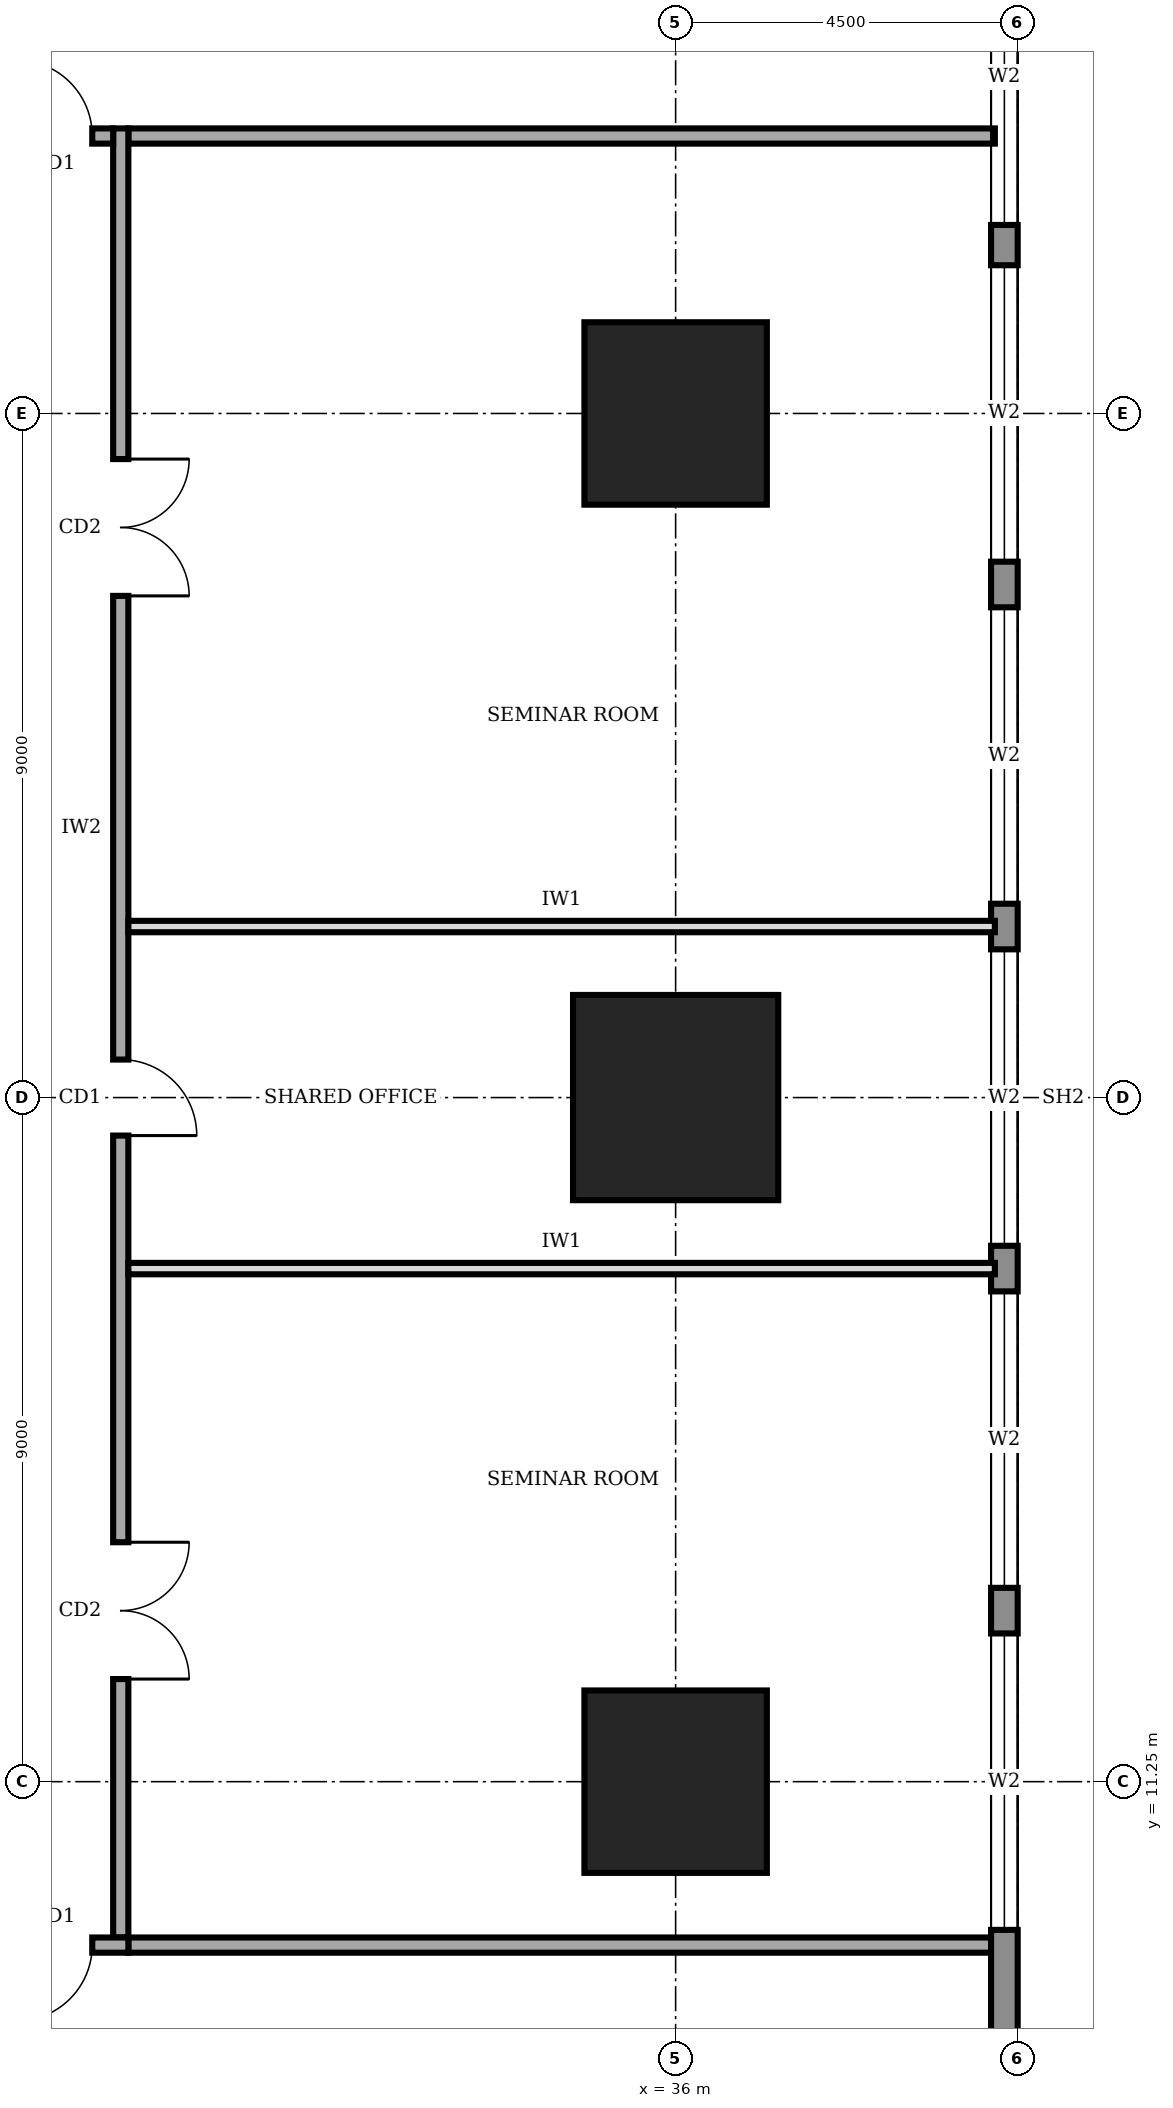
"""IFC4 building model, lengths in metres.
Left out: names, types, materials, properties, quantities, classifications, styles, units other than length and angle.
Written with IfcOpenShell. Run it as: python <this file> out.ifc"""

import sys

from ifc_helpers import new_model, si_unit, direction, frame, frame_2d, origin, origin_2d, place, context, subcontext, project, spatial, rectangle, extrude, element, fill, save


model = new_model("IFC4")
c1 = context("Model", 3, precision=1e-05, world=origin(), true_north=direction((0.0, 1.0)))
c2 = subcontext(c1, "Body", "Model", "MODEL_VIEW")
j1 = project(units=[si_unit("LENGTHUNIT", "METRE"), si_unit("PLANEANGLEUNIT", "RADIAN")], contexts=[c1])
p1 = place(None, origin())
s1 = spatial("IfcSite", under=j1, at=p1, CompositionType="ELEMENT")
p2 = place(p1, origin())
s2 = spatial("IfcBuilding", under=s1, at=p2, CompositionType="ELEMENT")
p3 = place(p2, frame((0.0, 0.0, 49.0)))
s3 = spatial("IfcBuildingStorey", under=s2, at=p3, CompositionType="ELEMENT", Elevation=49.0)
p4 = place(p3, frame((36.0, 11.25, 0.0), z_axis=(0.0, 0.0, 1.0), x_axis=(1.0, 0.0, 0.0)))
e1 = element("IfcColumn", 1, at=p4, inside=s3, PredefinedType="COLUMN", context=c2, shape_type="SweptSolid", body=[
    extrude(rectangle(XDim=2.4, YDim=2.4, at=origin_2d()), origin(), (0.0, 0.0, 1.0), 4.0),
])
p5 = place(p3, frame((36.0, 20.25, 0.0), z_axis=(0.0, 0.0, 1.0), x_axis=(1.0, 0.0, 0.0)))
e2 = element("IfcColumn", 2, at=p5, inside=s3, PredefinedType="COLUMN", context=c2, shape_type="SweptSolid", body=[
    extrude(rectangle(XDim=2.7, YDim=2.7, at=origin_2d()), origin(), (0.0, 0.0, 1.0), 4.0),
])
p6 = place(p3, frame((36.0, 29.25, 0.0), z_axis=(0.0, 0.0, 1.0), x_axis=(1.0, 0.0, 0.0)))
e3 = element("IfcColumn", 3, at=p6, inside=s3, PredefinedType="COLUMN", context=c2, shape_type="SweptSolid", body=[
    extrude(rectangle(XDim=2.4, YDim=2.4, at=origin_2d()), origin(), (0.0, 0.0, 1.0), 4.0),
])
p7 = place(p3, frame((40.325, 4.52, 0.0), z_axis=(0.0, 0.0, 1.0), x_axis=(0.0, 1.0, 0.0)))
e4 = element("IfcWall", 4, at=p7, inside=s3, PredefinedType="STANDARD", context=c2, shape_type="SweptSolid", body=[
    extrude(rectangle(XDim=31.46, YDim=0.35, at=frame_2d((15.73, 0.0))), origin(), (0.0, 0.0, 1.0), 3.75),
])
p8 = place(p7, frame((4.78, 0.0, 0.6)))
e5 = element("IfcOpeningElement", 5, at=p8, cuts=e4, PredefinedType="OPENING", context=c2, shape_type="SweptSolid", body=[
    extrude(rectangle(XDim=3.9, YDim=2.6, at=frame_2d((1.95, 1.3))), frame((0.0, 0.185, 0.0), z_axis=(0.0, -1.0, 0.0), x_axis=(1.0, 0.0, 0.0)), (0.0, 0.0, 1.0), 0.37),
])
p9 = place(p7, frame((9.28, 0.0, 0.6)))
e6 = element("IfcOpeningElement", 6, at=p9, cuts=e4, PredefinedType="OPENING", context=c2, shape_type="SweptSolid", body=[
    extrude(rectangle(XDim=3.9, YDim=2.6, at=frame_2d((1.95, 1.3))), frame((0.0, 0.185, 0.0), z_axis=(0.0, -1.0, 0.0), x_axis=(1.0, 0.0, 0.0)), (0.0, 0.0, 1.0), 0.37),
])
p10 = place(p7, frame((13.78, 0.0, 0.6)))
e7 = element("IfcOpeningElement", 7, at=p10, cuts=e4, PredefinedType="OPENING", context=c2, shape_type="SweptSolid", body=[
    extrude(rectangle(XDim=3.9, YDim=2.6, at=frame_2d((1.95, 1.3))), frame((0.0, 0.185, 0.0), z_axis=(0.0, -1.0, 0.0), x_axis=(1.0, 0.0, 0.0)), (0.0, 0.0, 1.0), 0.37),
])
p11 = place(p7, frame((18.28, 0.0, 0.6)))
e8 = element("IfcOpeningElement", 8, at=p11, cuts=e4, PredefinedType="OPENING", context=c2, shape_type="SweptSolid", body=[
    extrude(rectangle(XDim=3.9, YDim=2.6, at=frame_2d((1.95, 1.3))), frame((0.0, 0.185, 0.0), z_axis=(0.0, -1.0, 0.0), x_axis=(1.0, 0.0, 0.0)), (0.0, 0.0, 1.0), 0.37),
])
p12 = place(p7, frame((22.78, 0.0, 0.6)))
e9 = element("IfcOpeningElement", 9, at=p12, cuts=e4, PredefinedType="OPENING", context=c2, shape_type="SweptSolid", body=[
    extrude(rectangle(XDim=3.9, YDim=2.6, at=frame_2d((1.95, 1.3))), frame((0.0, 0.185, 0.0), z_axis=(0.0, -1.0, 0.0), x_axis=(1.0, 0.0, 0.0)), (0.0, 0.0, 1.0), 0.37),
])
p13 = place(p7, frame((27.21, 0.0, 0.6)))
e10 = element("IfcOpeningElement", 10, at=p13, cuts=e4, PredefinedType="OPENING", context=c2, shape_type="SweptSolid", body=[
    extrude(rectangle(XDim=3.9, YDim=2.6, at=frame_2d((1.95, 1.3))), frame((0.0, 0.185, 0.0), z_axis=(0.0, -1.0, 0.0), x_axis=(1.0, 0.0, 0.0)), (0.0, 0.0, 1.0), 0.37),
])
p14 = place(p3, frame((11.9, 9.1, 0.0), z_axis=(0.0, 0.0, 1.0), x_axis=(1.0, 0.0, 0.0)))
e11 = element("IfcWall", 11, at=p14, inside=s3, PredefinedType="SOLIDWALL", context=c2, shape_type="SweptSolid", body=[
    extrude(rectangle(XDim=16.9, YDim=0.2, at=frame_2d((8.45, 0.0))), origin(), (0.0, 0.0, 1.0), 3.75),
])
p15 = place(p14, frame((0.275, 0.0, 0.0)))
e12 = element("IfcOpeningElement", 12, at=p15, cuts=e11, PredefinedType="OPENING", context=c2, shape_type="SweptSolid", body=[
    extrude(rectangle(XDim=1.0, YDim=2.1, at=frame_2d((0.5, 1.05))), frame((0.0, 0.11, 0.0), z_axis=(0.0, -1.0, 0.0), x_axis=(1.0, 0.0, 0.0)), (0.0, 0.0, 1.0), 0.22),
])
p16 = place(p14, frame((7.45, 0.0, 0.0)))
e13 = element("IfcOpeningElement", 13, at=p16, cuts=e11, PredefinedType="OPENING", context=c2, shape_type="SweptSolid", body=[
    extrude(rectangle(XDim=1.8, YDim=2.1, at=frame_2d((0.9, 1.05))), frame((0.0, 0.11, 0.0), z_axis=(0.0, -1.0, 0.0), x_axis=(1.0, 0.0, 0.0)), (0.0, 0.0, 1.0), 0.22),
])
p17 = place(p14, frame((15.425, 0.0, 0.0)))
e14 = element("IfcOpeningElement", 14, at=p17, cuts=e11, PredefinedType="OPENING", context=c2, shape_type="SweptSolid", body=[
    extrude(rectangle(XDim=1.0, YDim=2.1, at=frame_2d((0.5, 1.05))), frame((0.0, 0.11, 0.0), z_axis=(0.0, -1.0, 0.0), x_axis=(1.0, 0.0, 0.0)), (0.0, 0.0, 1.0), 0.22),
])
p18 = place(p3, frame((28.7, 9.2, 0.0), z_axis=(0.0, 0.0, 1.0), x_axis=(0.0, 1.0, 0.0)))
e15 = element("IfcWall", 15, at=p18, inside=s3, PredefinedType="SOLIDWALL", context=c2, shape_type="SweptSolid", body=[
    extrude(rectangle(XDim=23.8, YDim=0.2, at=frame_2d((11.9, 0.0))), origin(), (0.0, 0.0, 1.0), 3.75),
])
p19 = place(p18, frame((3.4, 0.0, 0.0)))
e16 = element("IfcOpeningElement", 16, at=p19, cuts=e15, PredefinedType="OPENING", context=c2, shape_type="SweptSolid", body=[
    extrude(rectangle(XDim=1.8, YDim=2.1, at=frame_2d((0.9, 1.05))), frame((0.0, 0.11, 0.0), z_axis=(0.0, -1.0, 0.0), x_axis=(1.0, 0.0, 0.0)), (0.0, 0.0, 1.0), 0.22),
])
p20 = place(p18, frame((10.55, 0.0, 0.0)))
e17 = element("IfcOpeningElement", 17, at=p20, cuts=e15, PredefinedType="OPENING", context=c2, shape_type="SweptSolid", body=[
    extrude(rectangle(XDim=1.0, YDim=2.1, at=frame_2d((0.5, 1.05))), frame((0.0, 0.11, 0.0), z_axis=(0.0, -1.0, 0.0), x_axis=(1.0, 0.0, 0.0)), (0.0, 0.0, 1.0), 0.22),
])
p21 = place(p18, frame((17.65, 0.0, 0.0)))
e18 = element("IfcOpeningElement", 18, at=p21, cuts=e15, PredefinedType="OPENING", context=c2, shape_type="SweptSolid", body=[
    extrude(rectangle(XDim=1.8, YDim=2.1, at=frame_2d((0.9, 1.05))), frame((0.0, 0.11, 0.0), z_axis=(0.0, -1.0, 0.0), x_axis=(1.0, 0.0, 0.0)), (0.0, 0.0, 1.0), 0.22),
])
p22 = place(p3, frame((28.6, 32.9, 0.0), z_axis=(0.0, 0.0, 1.0), x_axis=(-1.0, 0.0, 0.0)))
e19 = element("IfcWall", 19, at=p22, inside=s3, PredefinedType="SOLIDWALL", context=c2, shape_type="SweptSolid", body=[
    extrude(rectangle(XDim=16.9, YDim=0.2, at=frame_2d((8.45, 0.0))), origin(), (0.0, 0.0, 1.0), 3.75),
])
p23 = place(p22, frame((15.425, 0.0, 0.0)))
e20 = element("IfcOpeningElement", 20, at=p23, cuts=e19, PredefinedType="OPENING", context=c2, shape_type="SweptSolid", body=[
    extrude(rectangle(XDim=1.0, YDim=2.1, at=frame_2d((0.5, 1.05))), frame((0.0, 0.11, 0.0), z_axis=(0.0, -1.0, 0.0), x_axis=(1.0, 0.0, 0.0)), (0.0, 0.0, 1.0), 0.22),
])
p24 = place(p22, frame((12.35, 0.0, 0.0)))
e21 = element("IfcOpeningElement", 21, at=p24, cuts=e19, PredefinedType="OPENING", context=c2, shape_type="SweptSolid", body=[
    extrude(rectangle(XDim=1.0, YDim=2.1, at=frame_2d((0.5, 1.05))), frame((0.0, 0.11, 0.0), z_axis=(0.0, -1.0, 0.0), x_axis=(1.0, 0.0, 0.0)), (0.0, 0.0, 1.0), 0.22),
])
p25 = place(p22, frame((5.6, 0.0, 0.0)))
e22 = element("IfcOpeningElement", 22, at=p25, cuts=e19, PredefinedType="OPENING", context=c2, shape_type="SweptSolid", body=[
    extrude(rectangle(XDim=1.0, YDim=2.1, at=frame_2d((0.5, 1.05))), frame((0.0, 0.11, 0.0), z_axis=(0.0, -1.0, 0.0), x_axis=(1.0, 0.0, 0.0)), (0.0, 0.0, 1.0), 0.22),
])
p26 = place(p22, frame((0.275, 0.0, 0.0)))
e23 = element("IfcOpeningElement", 23, at=p26, cuts=e19, PredefinedType="OPENING", context=c2, shape_type="SweptSolid", body=[
    extrude(rectangle(XDim=1.0, YDim=2.1, at=frame_2d((0.5, 1.05))), frame((0.0, 0.11, 0.0), z_axis=(0.0, -1.0, 0.0), x_axis=(1.0, 0.0, 0.0)), (0.0, 0.0, 1.0), 0.22),
])
for number, where, z_axis, x_axis in (
    (24, (28.8, 9.1, 0.0), (0.0, 0.0, 1.0), (1.0, 0.0, 0.0)),
    (25, (28.8, 32.9, 0.0), (0.0, 0.0, 1.0), (1.0, 0.0, 0.0)),
):
    element("IfcWall", number, at=place(p3, frame(where, z_axis=z_axis, x_axis=x_axis)), inside=s3, PredefinedType="SOLIDWALL", context=c2, shape_type="SweptSolid", body=[
        extrude(rectangle(XDim=11.4, YDim=0.2, at=frame_2d((5.7, 0.0))), origin(), (0.0, 0.0, 1.0), 3.75),
    ])
for number, where, z_axis, x_axis in (
    (26, (28.8, 18.0, 0.0), (0.0, 0.0, 1.0), (1.0, 0.0, 0.0)),
    (27, (28.8, 22.5, 0.0), (0.0, 0.0, 1.0), (1.0, 0.0, 0.0)),
):
    element("IfcWall", number, at=place(p3, frame(where, z_axis=z_axis, x_axis=x_axis)), inside=s3, PredefinedType="PARTITIONING", context=c2, shape_type="SweptSolid", body=[
        extrude(rectangle(XDim=11.4, YDim=0.15, at=frame_2d((5.7, 0.0))), origin(), (0.0, 0.0, 1.0), 3.75),
    ])
p27 = place(p8, origin())
e28 = element("IfcWindow", 28, at=p27, inside=s3, PartitioningType="SINGLE_PANEL", PredefinedType="WINDOW", context=c2, shape_type="SweptSolid", body=[
    extrude(rectangle(XDim=3.9, YDim=2.6, at=frame_2d((1.95, 1.3))), frame((0.0, 0.03, 0.0), z_axis=(0.0, -1.0, 0.0), x_axis=(1.0, 0.0, 0.0)), (0.0, 0.0, 1.0), 0.06),
])
fill(e5, e28)
p28 = place(p9, origin())
e29 = element("IfcWindow", 29, at=p28, inside=s3, PartitioningType="SINGLE_PANEL", PredefinedType="WINDOW", context=c2, shape_type="SweptSolid", body=[
    extrude(rectangle(XDim=3.9, YDim=2.6, at=frame_2d((1.95, 1.3))), frame((0.0, 0.03, 0.0), z_axis=(0.0, -1.0, 0.0), x_axis=(1.0, 0.0, 0.0)), (0.0, 0.0, 1.0), 0.06),
])
fill(e6, e29)
p29 = place(p10, origin())
e30 = element("IfcWindow", 30, at=p29, inside=s3, PartitioningType="SINGLE_PANEL", PredefinedType="WINDOW", context=c2, shape_type="SweptSolid", body=[
    extrude(rectangle(XDim=3.9, YDim=2.6, at=frame_2d((1.95, 1.3))), frame((0.0, 0.03, 0.0), z_axis=(0.0, -1.0, 0.0), x_axis=(1.0, 0.0, 0.0)), (0.0, 0.0, 1.0), 0.06),
])
fill(e7, e30)
p30 = place(p11, origin())
e31 = element("IfcWindow", 31, at=p30, inside=s3, PartitioningType="SINGLE_PANEL", PredefinedType="WINDOW", context=c2, shape_type="SweptSolid", body=[
    extrude(rectangle(XDim=3.9, YDim=2.6, at=frame_2d((1.95, 1.3))), frame((0.0, 0.03, 0.0), z_axis=(0.0, -1.0, 0.0), x_axis=(1.0, 0.0, 0.0)), (0.0, 0.0, 1.0), 0.06),
])
fill(e8, e31)
p31 = place(p12, origin())
e32 = element("IfcWindow", 32, at=p31, inside=s3, PartitioningType="SINGLE_PANEL", PredefinedType="WINDOW", context=c2, shape_type="SweptSolid", body=[
    extrude(rectangle(XDim=3.9, YDim=2.6, at=frame_2d((1.95, 1.3))), frame((0.0, 0.03, 0.0), z_axis=(0.0, -1.0, 0.0), x_axis=(1.0, 0.0, 0.0)), (0.0, 0.0, 1.0), 0.06),
])
fill(e9, e32)
p32 = place(p13, origin())
e33 = element("IfcWindow", 33, at=p32, inside=s3, PartitioningType="SINGLE_PANEL", PredefinedType="WINDOW", context=c2, shape_type="SweptSolid", body=[
    extrude(rectangle(XDim=3.9, YDim=2.6, at=frame_2d((1.95, 1.3))), frame((0.0, 0.03, 0.0), z_axis=(0.0, -1.0, 0.0), x_axis=(1.0, 0.0, 0.0)), (0.0, 0.0, 1.0), 0.06),
])
fill(e10, e33)
p33 = place(p17, frame((1.0, 0.0, 0.0), z_axis=(0.0, 0.0, 1.0), x_axis=(-1.0, 0.0, 0.0)))
e34 = element("IfcDoor", 34, at=p33, inside=s3, OperationType="SINGLE_SWING_RIGHT", PredefinedType="DOOR", context=c2, shape_type="SweptSolid", body=[
    extrude(rectangle(XDim=1.0, YDim=2.1, at=frame_2d((0.5, 1.05))), frame((0.0, 0.025, 0.0), z_axis=(0.0, -1.0, 0.0), x_axis=(1.0, 0.0, 0.0)), (0.0, 0.0, 1.0), 0.05),
])
fill(e14, e34)
p34 = place(p19, frame((1.8, 0.0, 0.0), z_axis=(0.0, 0.0, 1.0), x_axis=(-1.0, 0.0, 0.0)))
e35 = element("IfcDoor", 35, at=p34, inside=s3, OperationType="DOUBLE_DOOR_SINGLE_SWING", PredefinedType="DOOR", context=c2, shape_type="SweptSolid", body=[
    extrude(rectangle(XDim=1.8, YDim=2.1, at=frame_2d((0.9, 1.05))), frame((0.0, 0.025, 0.0), z_axis=(0.0, -1.0, 0.0), x_axis=(1.0, 0.0, 0.0)), (0.0, 0.0, 1.0), 0.05),
])
fill(e16, e35)
p35 = place(p20, frame((1.0, 0.0, 0.0), z_axis=(0.0, 0.0, 1.0), x_axis=(-1.0, 0.0, 0.0)))
e36 = element("IfcDoor", 36, at=p35, inside=s3, OperationType="SINGLE_SWING_RIGHT", PredefinedType="DOOR", context=c2, shape_type="SweptSolid", body=[
    extrude(rectangle(XDim=1.0, YDim=2.1, at=frame_2d((0.5, 1.05))), frame((0.0, 0.025, 0.0), z_axis=(0.0, -1.0, 0.0), x_axis=(1.0, 0.0, 0.0)), (0.0, 0.0, 1.0), 0.05),
])
fill(e17, e36)
p36 = place(p21, frame((1.8, 0.0, 0.0), z_axis=(0.0, 0.0, 1.0), x_axis=(-1.0, 0.0, 0.0)))
e37 = element("IfcDoor", 37, at=p36, inside=s3, OperationType="DOUBLE_DOOR_SINGLE_SWING", PredefinedType="DOOR", context=c2, shape_type="SweptSolid", body=[
    extrude(rectangle(XDim=1.8, YDim=2.1, at=frame_2d((0.9, 1.05))), frame((0.0, 0.025, 0.0), z_axis=(0.0, -1.0, 0.0), x_axis=(1.0, 0.0, 0.0)), (0.0, 0.0, 1.0), 0.05),
])
fill(e18, e37)
p37 = place(p26, frame((1.0, 0.0, 0.0), z_axis=(0.0, 0.0, 1.0), x_axis=(-1.0, 0.0, 0.0)))
e38 = element("IfcDoor", 38, at=p37, inside=s3, OperationType="SINGLE_SWING_LEFT", PredefinedType="DOOR", context=c2, shape_type="SweptSolid", body=[
    extrude(rectangle(XDim=1.0, YDim=2.1, at=frame_2d((0.5, 1.05))), frame((0.0, 0.025, 0.0), z_axis=(0.0, -1.0, 0.0), x_axis=(1.0, 0.0, 0.0)), (0.0, 0.0, 1.0), 0.05),
])
fill(e23, e38)
save(model, sys.argv[1])
